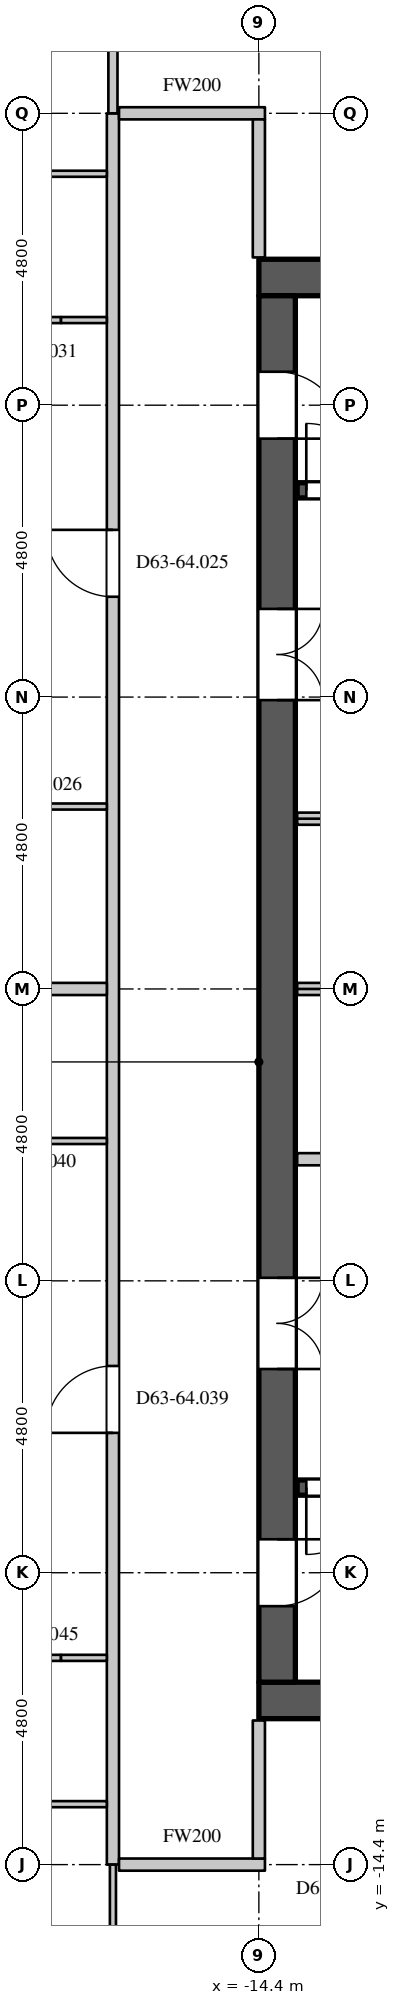
"""IFC4 building model, lengths in metres.
Left out: names, types, materials, properties, quantities, classifications, styles, units other than length and angle.
Written with IfcOpenShell. Run it as: python <this file> out.ifc"""

import sys

from ifc_helpers import new_model, si_unit, direction, frame, frame_2d, origin, place, context, subcontext, project, spatial, rectangle, extrude, element, fill, save


model = new_model("IFC4")
c1 = context("Model", 3, precision=1e-05, world=origin(), true_north=direction((0.0, 1.0)))
c2 = subcontext(c1, "Body", "Model", "MODEL_VIEW")
j1 = project(units=[si_unit("LENGTHUNIT", "METRE"), si_unit("PLANEANGLEUNIT", "RADIAN")], contexts=[c1])
p1 = place(None, origin())
s1 = spatial("IfcSite", under=j1, at=p1, CompositionType="ELEMENT")
p2 = place(p1, origin())
s2 = spatial("IfcBuilding", under=s1, at=p2, CompositionType="ELEMENT")
p3 = place(p2, frame((0.0, 0.0, 272.7)))
s3 = spatial("IfcBuildingStorey", under=s2, at=p3, CompositionType="ELEMENT", Elevation=272.7)
for number, where, z_axis, x_axis in (
    (1, (-14.4, 11.7, 0.0), (0.0, 0.0, 1.0), (1.0, 0.0, 0.0)),
    (2, (-14.4, -11.7, 0.0), (0.0, 0.0, 1.0), (1.0, 0.0, 0.0)),
):
    element("IfcWall", number, at=place(p3, frame(where, z_axis=z_axis, x_axis=x_axis)), inside=s3, PredefinedType="SHEAR", context=c2, shape_type="SweptSolid", body=[
        extrude(rectangle(XDim=28.8, YDim=0.6, at=frame_2d((14.4, 0.0))), origin(), (0.0, 0.0, 1.0), 4.2),
    ])
p4 = place(p3, frame((-14.1, -11.4, 0.0), z_axis=(0.0, 0.0, 1.0), x_axis=(0.0, 1.0, 0.0)))
e3 = element("IfcWall", 3, at=p4, inside=s3, PredefinedType="SHEAR", context=c2, shape_type="SweptSolid", body=[
    extrude(rectangle(XDim=22.8, YDim=0.6, at=frame_2d((11.4, 0.0))), origin(), (0.0, 0.0, 1.0), 4.2),
])
p5 = place(p4, frame((20.45, 0.0, 0.0)))
e4 = element("IfcOpeningElement", 4, at=p5, cuts=e3, PredefinedType="OPENING", context=c2, shape_type="SweptSolid", body=[
    extrude(rectangle(XDim=1.1, YDim=2.2, at=frame_2d((0.55, 1.1))), frame((0.0, 0.31, 0.0), z_axis=(0.0, -1.0, 0.0), x_axis=(1.0, 0.0, 0.0)), (0.0, 0.0, 1.0), 0.62),
])
p6 = place(p4, frame((1.25, 0.0, 0.0)))
e5 = element("IfcOpeningElement", 5, at=p6, cuts=e3, PredefinedType="OPENING", context=c2, shape_type="SweptSolid", body=[
    extrude(rectangle(XDim=1.1, YDim=2.2, at=frame_2d((0.55, 1.1))), frame((0.0, 0.31, 0.0), z_axis=(0.0, -1.0, 0.0), x_axis=(1.0, 0.0, 0.0)), (0.0, 0.0, 1.0), 0.62),
])
p7 = place(p4, frame((16.15, 0.0, 0.0)))
e6 = element("IfcOpeningElement", 6, at=p7, cuts=e3, PredefinedType="OPENING", context=c2, shape_type="SweptSolid", body=[
    extrude(rectangle(XDim=1.5, YDim=2.4, at=frame_2d((0.75, 1.2))), frame((0.0, 0.31, 0.0), z_axis=(0.0, -1.0, 0.0), x_axis=(1.0, 0.0, 0.0)), (0.0, 0.0, 1.0), 0.62),
])
p8 = place(p4, frame((5.15, 0.0, 0.0)))
e7 = element("IfcOpeningElement", 7, at=p8, cuts=e3, PredefinedType="OPENING", context=c2, shape_type="SweptSolid", body=[
    extrude(rectangle(XDim=1.5, YDim=2.4, at=frame_2d((0.75, 1.2))), frame((0.0, 0.31, 0.0), z_axis=(0.0, -1.0, 0.0), x_axis=(1.0, 0.0, 0.0)), (0.0, 0.0, 1.0), 0.62),
])
p9 = place(p3, frame((-16.8, -14.4, 0.0), z_axis=(0.0, 0.0, 1.0), x_axis=(0.0, 1.0, 0.0)))
e8 = element("IfcWall", 8, at=p9, inside=s3, PredefinedType="PARTITIONING", context=c2, shape_type="SweptSolid", body=[
    extrude(rectangle(XDim=28.8, YDim=0.2, at=frame_2d((14.4, 0.0))), origin(), (0.0, 0.0, 1.0), 3.95),
])
p10 = place(p9, frame((20.85, 0.0, 0.0)))
e9 = element("IfcOpeningElement", 9, at=p10, cuts=e8, PredefinedType="OPENING", context=c2, shape_type="SweptSolid", body=[
    extrude(rectangle(XDim=1.1, YDim=2.4, at=frame_2d((0.55, 1.2))), frame((0.0, 0.11, 0.0), z_axis=(0.0, -1.0, 0.0), x_axis=(1.0, 0.0, 0.0)), (0.0, 0.0, 1.0), 0.22),
])
p11 = place(p9, frame((7.1, 0.0, 0.0)))
e10 = element("IfcOpeningElement", 10, at=p11, cuts=e8, PredefinedType="OPENING", context=c2, shape_type="SweptSolid", body=[
    extrude(rectangle(XDim=1.1, YDim=2.4, at=frame_2d((0.55, 1.2))), frame((0.0, 0.11, 0.0), z_axis=(0.0, -1.0, 0.0), x_axis=(1.0, 0.0, 0.0)), (0.0, 0.0, 1.0), 0.22),
])
for number, where, z_axis, x_axis in (
    (11, (-16.7, -14.4, 0.0), (0.0, 0.0, 1.0), (1.0, 0.0, 0.0)),
    (12, (-16.7, 14.4, 0.0), (0.0, 0.0, 1.0), (1.0, 0.0, 0.0)),
):
    element("IfcWall", number, at=place(p3, frame(where, z_axis=z_axis, x_axis=x_axis)), inside=s3, PredefinedType="PARTITIONING", context=c2, shape_type="SweptSolid", body=[
        extrude(rectangle(XDim=2.4, YDim=0.2, at=frame_2d((1.2, 0.0))), origin(), (0.0, 0.0, 1.0), 3.95),
    ])
for number, where, z_axis, x_axis in (
    (13, (-14.4, -14.3, 0.0), (0.0, 0.0, 1.0), (0.0, 1.0, 0.0)),
    (14, (-14.4, 12.03, 0.0), (0.0, 0.0, 1.0), (0.0, 1.0, 0.0)),
):
    element("IfcWall", number, at=place(p3, frame(where, z_axis=z_axis, x_axis=x_axis)), inside=s3, PredefinedType="PARTITIONING", context=c2, shape_type="SweptSolid", body=[
        extrude(rectangle(XDim=2.27, YDim=0.2, at=frame_2d((1.135, 0.0))), origin(), (0.0, 0.0, 1.0), 3.95),
    ])
p12 = place(p3, frame((-16.8, 14.4, 0.0), z_axis=(0.0, 0.0, 1.0), x_axis=(0.0, 1.0, 0.0)))
e15 = element("IfcWall", 15, at=p12, inside=s3, PredefinedType="PARTITIONING", context=c2, shape_type="SweptSolid", body=[
    extrude(rectangle(XDim=5.428, YDim=0.15, at=frame_2d((2.714, 0.0))), origin(), (0.0, 0.0, 1.0), 3.95),
])
p13 = place(p12, frame((1.65, 0.0, 0.0)))
e16 = element("IfcOpeningElement", 16, at=p13, cuts=e15, PredefinedType="OPENING", context=c2, shape_type="SweptSolid", body=[
    extrude(rectangle(XDim=0.9, YDim=2.2, at=frame_2d((0.45, 1.1))), frame((0.0, 0.085, 0.0), z_axis=(0.0, -1.0, 0.0), x_axis=(1.0, 0.0, 0.0)), (0.0, 0.0, 1.0), 0.17),
])
p14 = place(p3, frame((-26.455, 0.0, 0.0), z_axis=(0.0, 0.0, 1.0), x_axis=(1.0, 0.0, 0.0)))
e17 = element("IfcWall", 17, at=p14, inside=s3, PredefinedType="PARTITIONING", context=c2, shape_type="SweptSolid", body=[
    extrude(rectangle(XDim=9.555, YDim=0.2, at=frame_2d((4.778, 0.0))), origin(), (0.0, 0.0, 1.0), 3.95),
])
p15 = place(p3, frame((-13.77, -2.8, 0.0), z_axis=(0.0, 0.0, 1.0), x_axis=(1.0, 0.0, 0.0)))
e18 = element("IfcWall", 18, at=p15, inside=s3, PredefinedType="PARTITIONING", context=c2, shape_type="SweptSolid", body=[
    extrude(rectangle(XDim=3.37, YDim=0.2, at=frame_2d((1.685, 0.0))), origin(), (0.0, 0.0, 1.0), 3.95),
])
p16 = place(p15, frame((1.35, 0.0, 0.0)))
e19 = element("IfcOpeningElement", 19, at=p16, cuts=e18, PredefinedType="OPENING", context=c2, shape_type="SweptSolid", body=[
    extrude(rectangle(XDim=0.6, YDim=2.0, at=frame_2d((0.3, 1.0))), frame((0.0, 0.11, 0.0), z_axis=(0.0, -1.0, 0.0), x_axis=(1.0, 0.0, 0.0)), (0.0, 0.0, 1.0), 0.22),
])
p17 = place(p3, frame((-13.77, 0.0, 0.0), z_axis=(0.0, 0.0, 1.0), x_axis=(1.0, 0.0, 0.0)))
e20 = element("IfcWall", 20, at=p17, inside=s3, PredefinedType="PARTITIONING", context=c2, shape_type="SweptSolid", body=[
    extrude(rectangle(XDim=21.57, YDim=0.2, at=frame_2d((10.785, 0.0))), origin(), (0.0, 0.0, 1.0), 3.95),
])
p18 = place(p3, frame((-13.77, 2.8, 0.0), z_axis=(0.0, 0.0, 1.0), x_axis=(1.0, 0.0, 0.0)))
e21 = element("IfcWall", 21, at=p18, inside=s3, PredefinedType="PARTITIONING", context=c2, shape_type="SweptSolid", body=[
    extrude(rectangle(XDim=5.95, YDim=0.2, at=frame_2d((2.975, 0.0))), origin(), (0.0, 0.0, 1.0), 3.95),
])
p19 = place(p18, frame((1.1, 0.0, 0.0)))
e22 = element("IfcOpeningElement", 22, at=p19, cuts=e21, PredefinedType="OPENING", context=c2, shape_type="SweptSolid", body=[
    extrude(rectangle(XDim=1.1, YDim=2.2, at=frame_2d((0.55, 1.1))), frame((0.0, 0.11, 0.0), z_axis=(0.0, -1.0, 0.0), x_axis=(1.0, 0.0, 0.0)), (0.0, 0.0, 1.0), 0.22),
])
p20 = place(p18, frame((4.1, 0.0, 0.0)))
e23 = element("IfcOpeningElement", 23, at=p20, cuts=e21, PredefinedType="OPENING", context=c2, shape_type="SweptSolid", body=[
    extrude(rectangle(XDim=1.1, YDim=2.2, at=frame_2d((0.55, 1.1))), frame((0.0, 0.11, 0.0), z_axis=(0.0, -1.0, 0.0), x_axis=(1.0, 0.0, 0.0)), (0.0, 0.0, 1.0), 0.22),
])
p21 = place(p3, frame((-13.77, -8.2, 0.0), z_axis=(0.0, 0.0, 1.0), x_axis=(1.0, 0.0, 0.0)))
e24 = element("IfcWall", 24, at=p21, inside=s3, PredefinedType="SHEAR", context=c2, shape_type="SweptSolid", body=[
    extrude(rectangle(XDim=8.495, YDim=0.25, at=frame_2d((4.248, 0.0))), origin(), (0.0, 0.0, 1.0), 3.95),
])
p22 = place(p21, frame((0.15, 0.0, 0.0)))
e25 = element("IfcOpeningElement", 25, at=p22, cuts=e24, PredefinedType="OPENING", context=c2, shape_type="SweptSolid", body=[
    extrude(rectangle(XDim=1.1, YDim=2.2, at=frame_2d((0.55, 1.1))), frame((0.0, 0.135, 0.0), z_axis=(0.0, -1.0, 0.0), x_axis=(1.0, 0.0, 0.0)), (0.0, 0.0, 1.0), 0.27),
])
p23 = place(p3, frame((-13.77, 8.2, 0.0), z_axis=(0.0, 0.0, 1.0), x_axis=(1.0, 0.0, 0.0)))
e26 = element("IfcWall", 26, at=p23, inside=s3, PredefinedType="SHEAR", context=c2, shape_type="SweptSolid", body=[
    extrude(rectangle(XDim=8.495, YDim=0.25, at=frame_2d((4.248, 0.0))), origin(), (0.0, 0.0, 1.0), 3.95),
])
p24 = place(p23, frame((0.15, 0.0, 0.0)))
e27 = element("IfcOpeningElement", 27, at=p24, cuts=e26, PredefinedType="OPENING", context=c2, shape_type="SweptSolid", body=[
    extrude(rectangle(XDim=1.1, YDim=2.2, at=frame_2d((0.55, 1.1))), frame((0.0, 0.135, 0.0), z_axis=(0.0, -1.0, 0.0), x_axis=(1.0, 0.0, 0.0)), (0.0, 0.0, 1.0), 0.27),
])
p25 = place(p3, frame((-20.7, -13.406, 0.0), z_axis=(0.0, 0.0, 1.0), x_axis=(1.0, 0.0, 0.0)))
e28 = element("IfcWall", 28, at=p25, inside=s3, PredefinedType="PARTITIONING", context=c2, shape_type="SweptSolid", body=[
    extrude(rectangle(XDim=3.8, YDim=0.1, at=frame_2d((1.9, 0.0))), origin(), (0.0, 0.0, 1.0), 3.95),
])
p26 = place(p3, frame((-20.625, -11.0, 0.0), z_axis=(0.0, 0.0, 1.0), x_axis=(1.0, 0.0, 0.0)))
e29 = element("IfcWall", 29, at=p26, inside=s3, PredefinedType="PARTITIONING", context=c2, shape_type="SweptSolid", body=[
    extrude(rectangle(XDim=2.971, YDim=0.1, at=frame_2d((1.486, 0.0))), origin(), (0.0, 0.0, 1.0), 3.95),
])
p27 = place(p26, frame((1.4, 0.0, 0.0)))
e30 = element("IfcOpeningElement", 30, at=p27, cuts=e29, PredefinedType="OPENING", context=c2, shape_type="SweptSolid", body=[
    extrude(rectangle(XDim=0.9, YDim=2.2, at=frame_2d((0.45, 1.1))), frame((0.0, 0.06, 0.0), z_axis=(0.0, -1.0, 0.0), x_axis=(1.0, 0.0, 0.0)), (0.0, 0.0, 1.0), 0.12),
])
p28 = place(p3, frame((-17.654, -11.0, 0.0), z_axis=(0.0, 0.0, 1.0), x_axis=(1.0, 0.0, 0.0)))
e31 = element("IfcWall", 31, at=p28, inside=s3, PredefinedType="PARTITIONING", context=c2, shape_type="SweptSolid", body=[
    extrude(rectangle(XDim=0.754, YDim=0.1, at=frame_2d((0.377, 0.0))), origin(), (0.0, 0.0, 1.0), 3.35),
])
p29 = place(p3, frame((-20.425, 11.0, 0.0), z_axis=(0.0, 0.0, 1.0), x_axis=(1.0, 0.0, 0.0)))
e32 = element("IfcWall", 32, at=p29, inside=s3, PredefinedType="PARTITIONING", context=c2, shape_type="SweptSolid", body=[
    extrude(rectangle(XDim=2.771, YDim=0.1, at=frame_2d((1.386, 0.0))), origin(), (0.0, 0.0, 1.0), 3.95),
])
p30 = place(p29, frame((1.3, 0.0, 0.0)))
e33 = element("IfcOpeningElement", 33, at=p30, cuts=e32, PredefinedType="OPENING", context=c2, shape_type="SweptSolid", body=[
    extrude(rectangle(XDim=0.9, YDim=2.2, at=frame_2d((0.45, 1.1))), frame((0.0, 0.06, 0.0), z_axis=(0.0, -1.0, 0.0), x_axis=(1.0, 0.0, 0.0)), (0.0, 0.0, 1.0), 0.12),
])
p31 = place(p3, frame((-17.654, 11.0, 0.0), z_axis=(0.0, 0.0, 1.0), x_axis=(1.0, 0.0, 0.0)))
e34 = element("IfcWall", 34, at=p31, inside=s3, PredefinedType="PARTITIONING", context=c2, shape_type="SweptSolid", body=[
    extrude(rectangle(XDim=0.754, YDim=0.1, at=frame_2d((0.377, 0.0))), origin(), (0.0, 0.0, 1.0), 3.35),
])
p32 = place(p3, frame((-20.5, 13.406, 0.0), z_axis=(0.0, 0.0, 1.0), x_axis=(1.0, 0.0, 0.0)))
e35 = element("IfcWall", 35, at=p32, inside=s3, PredefinedType="PARTITIONING", context=c2, shape_type="SweptSolid", body=[
    extrude(rectangle(XDim=3.6, YDim=0.1, at=frame_2d((1.8, 0.0))), origin(), (0.0, 0.0, 1.0), 3.95),
])
p33 = place(p3, frame((-20.125, -2.5, 0.0), z_axis=(0.0, 0.0, 1.0), x_axis=(1.0, 0.0, 0.0)))
e36 = element("IfcWall", 36, at=p33, inside=s3, PredefinedType="PARTITIONING", context=c2, shape_type="SweptSolid", body=[
    extrude(rectangle(XDim=3.225, YDim=0.1, at=frame_2d((1.613, 0.0))), origin(), (0.0, 0.0, 1.0), 3.95),
])
p34 = place(p33, frame((1.15, 0.0, 0.0)))
e37 = element("IfcOpeningElement", 37, at=p34, cuts=e36, PredefinedType="OPENING", context=c2, shape_type="SweptSolid", body=[
    extrude(rectangle(XDim=0.9, YDim=2.2, at=frame_2d((0.45, 1.1))), frame((0.0, 0.06, 0.0), z_axis=(0.0, -1.0, 0.0), x_axis=(1.0, 0.0, 0.0)), (0.0, 0.0, 1.0), 0.12),
])
p35 = place(p3, frame((-19.925, 3.0, 0.0), z_axis=(0.0, 0.0, 1.0), x_axis=(1.0, 0.0, 0.0)))
e38 = element("IfcWall", 38, at=p35, inside=s3, PredefinedType="PARTITIONING", context=c2, shape_type="SweptSolid", body=[
    extrude(rectangle(XDim=3.025, YDim=0.1, at=frame_2d((1.513, 0.0))), origin(), (0.0, 0.0, 1.0), 3.95),
])
p36 = place(p35, frame((1.05, 0.0, 0.0)))
e39 = element("IfcOpeningElement", 39, at=p36, cuts=e38, PredefinedType="OPENING", context=c2, shape_type="SweptSolid", body=[
    extrude(rectangle(XDim=0.9, YDim=2.2, at=frame_2d((0.45, 1.1))), frame((0.0, 0.06, 0.0), z_axis=(0.0, -1.0, 0.0), x_axis=(1.0, 0.0, 0.0)), (0.0, 0.0, 1.0), 0.12),
])
p37 = place(p3, frame((-16.8, -18.0, 0.0), z_axis=(0.0, 0.0, 1.0), x_axis=(0.0, 1.0, 0.0)))
e40 = element("IfcWall", 40, at=p37, inside=s3, PredefinedType="PARTITIONING", context=c2, shape_type="SweptSolid", body=[
    extrude(rectangle(XDim=3.6, YDim=0.1, at=frame_2d((1.8, 0.0))), origin(), (0.0, 0.0, 1.0), 3.95),
])
p38 = place(p24, origin())
e41 = element("IfcDoor", 41, at=p38, inside=s3, OperationType="SINGLE_SWING_LEFT", PredefinedType="DOOR", context=c2, shape_type="SweptSolid", body=[
    extrude(rectangle(XDim=1.1, YDim=2.2, at=frame_2d((0.55, 1.1))), frame((0.0, 0.025, 0.0), z_axis=(0.0, -1.0, 0.0), x_axis=(1.0, 0.0, 0.0)), (0.0, 0.0, 1.0), 0.05),
])
fill(e27, e41)
p39 = place(p22, origin())
e42 = element("IfcDoor", 42, at=p39, inside=s3, OperationType="SINGLE_SWING_RIGHT", PredefinedType="DOOR", context=c2, shape_type="SweptSolid", body=[
    extrude(rectangle(XDim=1.1, YDim=2.2, at=frame_2d((0.55, 1.1))), frame((0.0, 0.025, 0.0), z_axis=(0.0, -1.0, 0.0), x_axis=(1.0, 0.0, 0.0)), (0.0, 0.0, 1.0), 0.05),
])
fill(e25, e42)
p40 = place(p5, origin())
e43 = element("IfcDoor", 43, at=p40, inside=s3, OperationType="SINGLE_SWING_RIGHT", PredefinedType="DOOR", context=c2, shape_type="SweptSolid", body=[
    extrude(rectangle(XDim=1.1, YDim=2.2, at=frame_2d((0.55, 1.1))), frame((0.0, -0.245, 0.0), z_axis=(0.0, -1.0, 0.0), x_axis=(1.0, 0.0, 0.0)), (0.0, 0.0, 1.0), 0.05),
])
fill(e4, e43)
p41 = place(p6, origin())
e44 = element("IfcDoor", 44, at=p41, inside=s3, OperationType="SINGLE_SWING_LEFT", PredefinedType="DOOR", context=c2, shape_type="SweptSolid", body=[
    extrude(rectangle(XDim=1.1, YDim=2.2, at=frame_2d((0.55, 1.1))), frame((0.0, -0.245, 0.0), z_axis=(0.0, -1.0, 0.0), x_axis=(1.0, 0.0, 0.0)), (0.0, 0.0, 1.0), 0.05),
])
fill(e5, e44)
p42 = place(p7, origin())
e45 = element("IfcDoor", 45, at=p42, inside=s3, OperationType="DOUBLE_DOOR_SINGLE_SWING", PredefinedType="DOOR", context=c2, shape_type="SweptSolid", body=[
    extrude(rectangle(XDim=1.5, YDim=2.4, at=frame_2d((0.75, 1.2))), frame((0.0, -0.245, 0.0), z_axis=(0.0, -1.0, 0.0), x_axis=(1.0, 0.0, 0.0)), (0.0, 0.0, 1.0), 0.05),
])
fill(e6, e45)
p43 = place(p8, origin())
e46 = element("IfcDoor", 46, at=p43, inside=s3, OperationType="DOUBLE_DOOR_SINGLE_SWING", PredefinedType="DOOR", context=c2, shape_type="SweptSolid", body=[
    extrude(rectangle(XDim=1.5, YDim=2.4, at=frame_2d((0.75, 1.2))), frame((0.0, -0.245, 0.0), z_axis=(0.0, -1.0, 0.0), x_axis=(1.0, 0.0, 0.0)), (0.0, 0.0, 1.0), 0.05),
])
fill(e7, e46)
p44 = place(p10, origin())
e47 = element("IfcDoor", 47, at=p44, inside=s3, OperationType="SINGLE_SWING_RIGHT", PredefinedType="DOOR", context=c2, shape_type="SweptSolid", body=[
    extrude(rectangle(XDim=1.1, YDim=2.4, at=frame_2d((0.55, 1.2))), frame((0.0, 0.025, 0.0), z_axis=(0.0, -1.0, 0.0), x_axis=(1.0, 0.0, 0.0)), (0.0, 0.0, 1.0), 0.05),
])
fill(e9, e47)
p45 = place(p11, origin())
e48 = element("IfcDoor", 48, at=p45, inside=s3, OperationType="SINGLE_SWING_LEFT", PredefinedType="DOOR", context=c2, shape_type="SweptSolid", body=[
    extrude(rectangle(XDim=1.1, YDim=2.4, at=frame_2d((0.55, 1.2))), frame((0.0, 0.025, 0.0), z_axis=(0.0, -1.0, 0.0), x_axis=(1.0, 0.0, 0.0)), (0.0, 0.0, 1.0), 0.05),
])
fill(e10, e48)
save(model, sys.argv[1])
